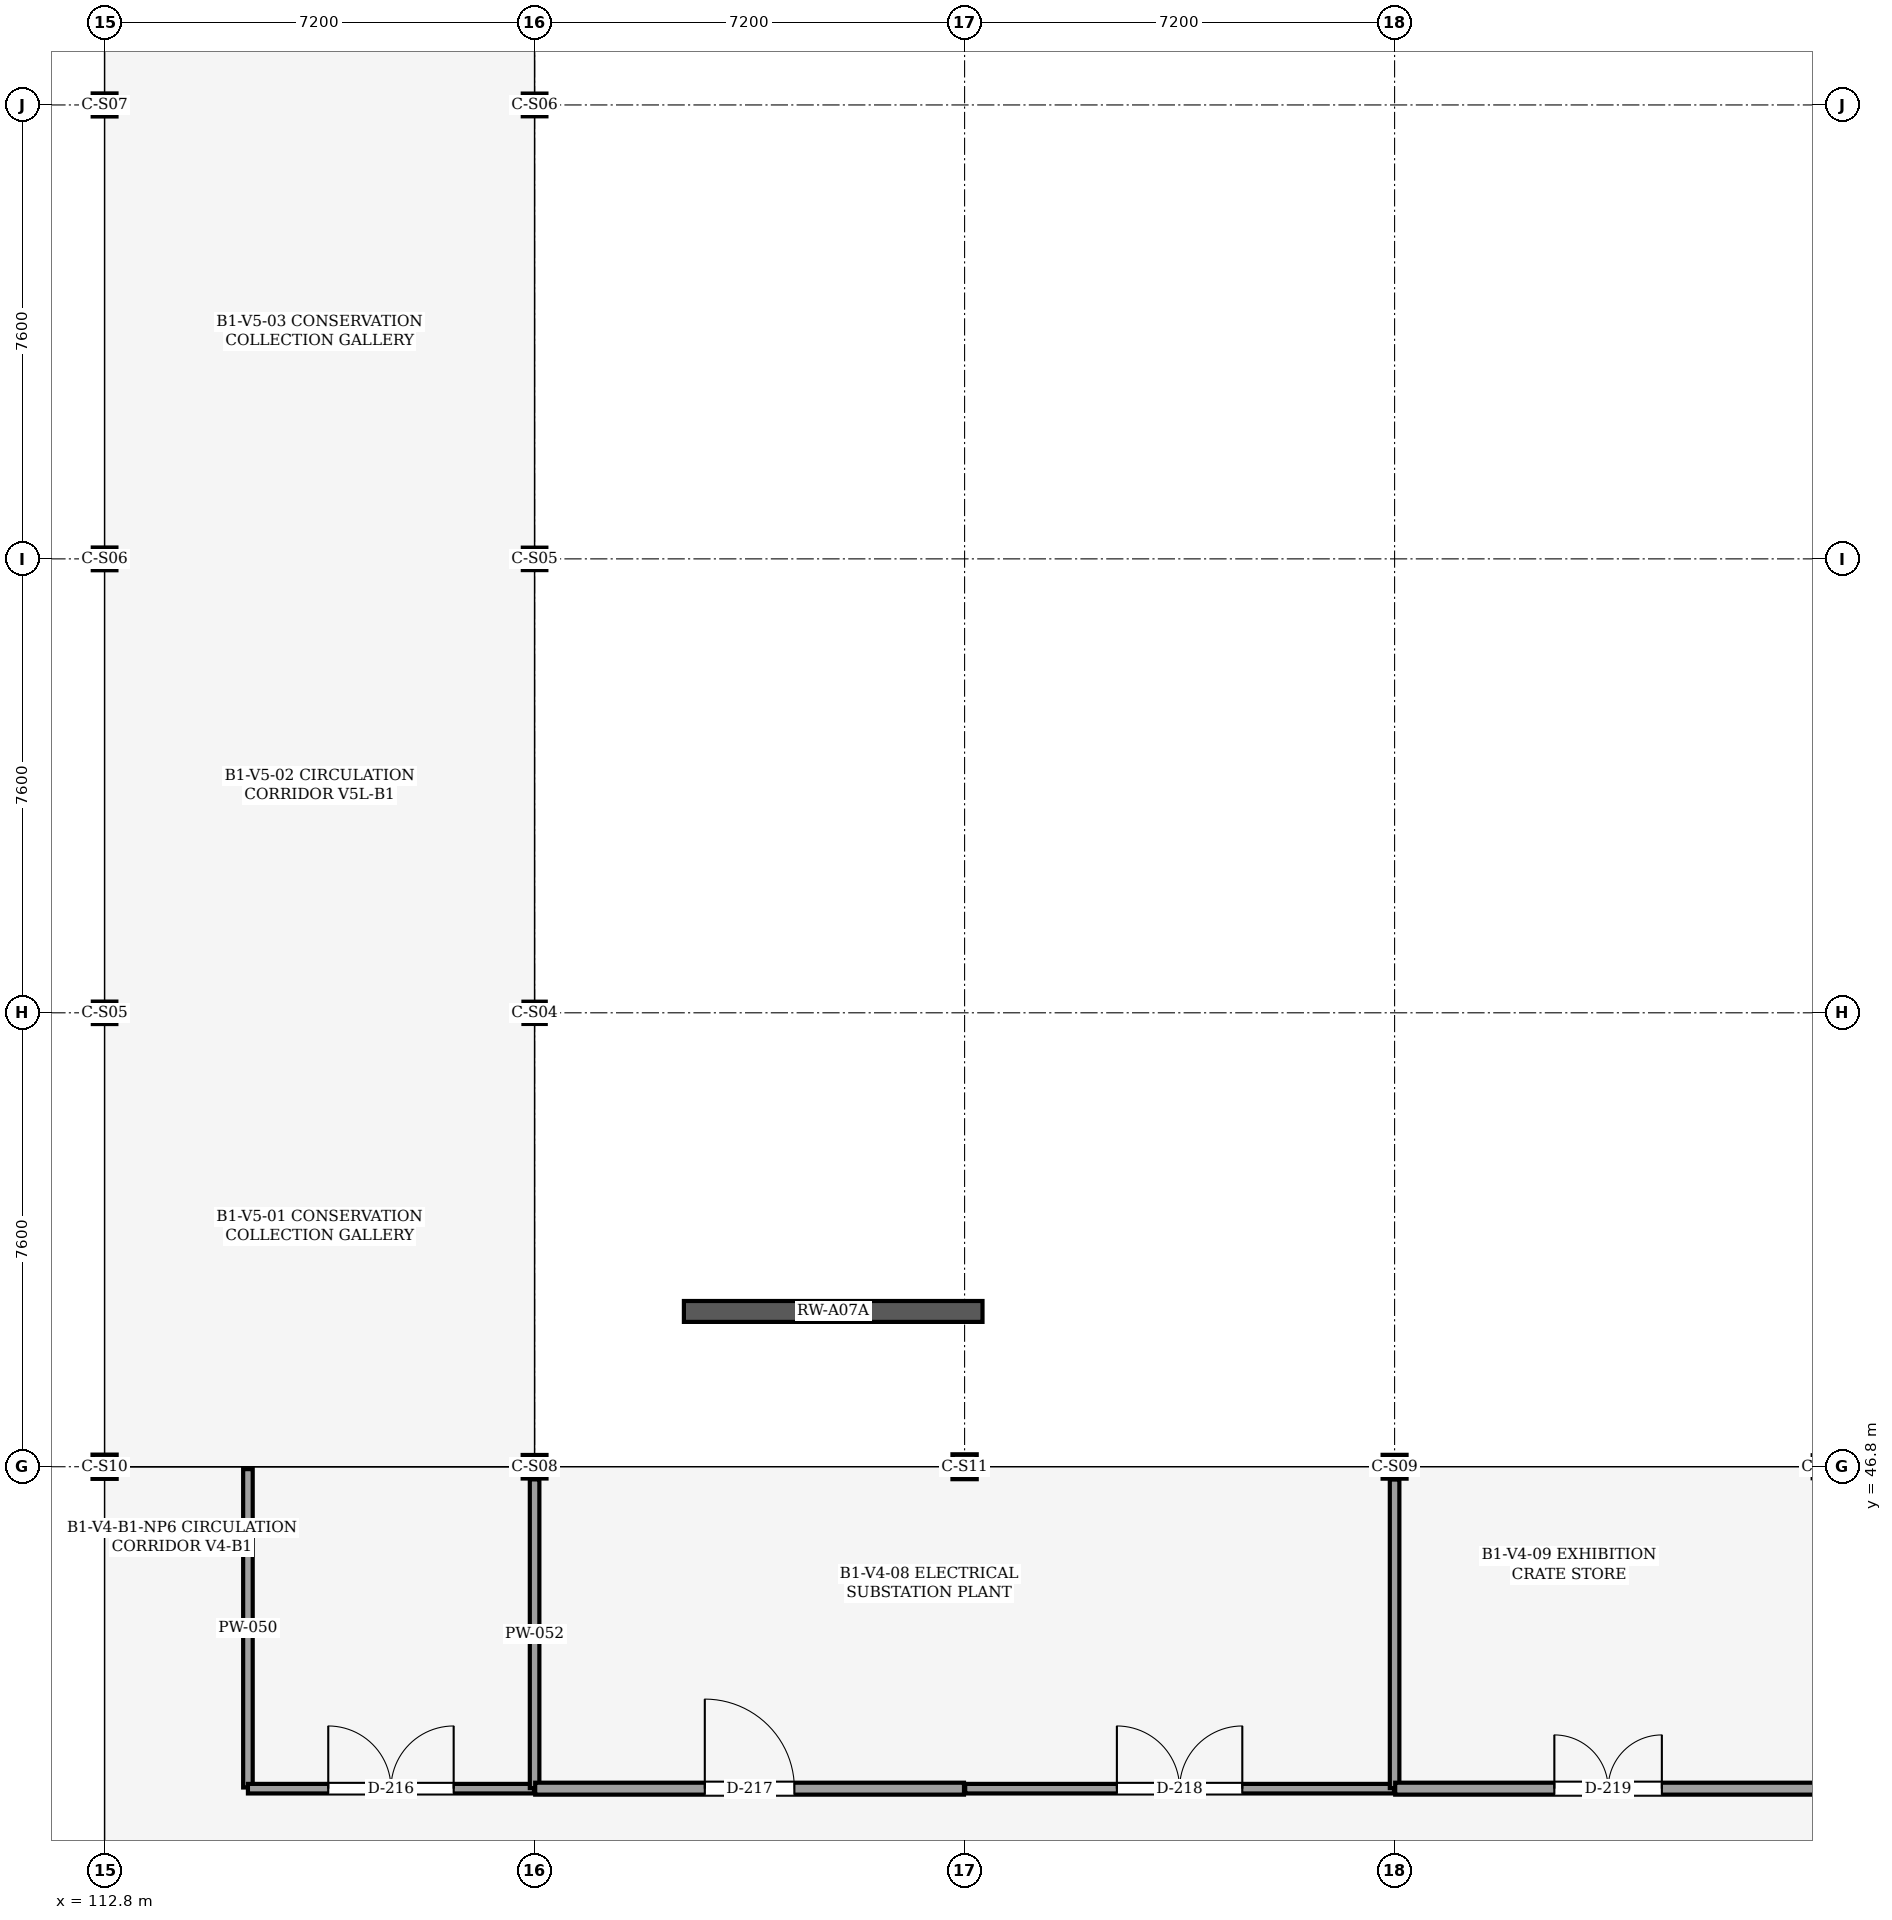
"""IFC4 building model, lengths in metres.
Left out: names, types, materials, properties, quantities, classifications, styles, units other than length and angle.
Written with IfcOpenShell. Run it as: python <this file> out.ifc"""

import sys

from ifc_helpers import new_model, si_unit, direction, frame, frame_2d, origin, origin_2d, place, context, subcontext, project, spatial, rectangle, i_section, extrude, element, fill, save


model = new_model("IFC4")
c1 = context("Model", 3, precision=1e-05, world=origin(), true_north=direction((0.0, 1.0)))
c2 = subcontext(c1, "Body", "Model", "MODEL_VIEW")
j1 = project(units=[si_unit("LENGTHUNIT", "METRE"), si_unit("PLANEANGLEUNIT", "RADIAN")], contexts=[c1])
p1 = place(None, origin())
s1 = spatial("IfcSite", under=j1, at=p1, CompositionType="ELEMENT")
p2 = place(p1, origin())
s2 = spatial("IfcBuilding", under=s1, at=p2, CompositionType="ELEMENT")
p3 = place(p2, frame((0.0, 0.0, -5.4)))
s3 = spatial("IfcBuildingStorey", under=s2, at=p3, CompositionType="ELEMENT", Elevation=-5.4)
p4 = place(p3, frame((112.8, 46.8, 0.0), z_axis=(0.0, 0.0, 1.0), x_axis=(1.0, 0.0, 0.0)))
e1 = element("IfcColumn", 1, at=p4, inside=s3, PredefinedType="COLUMN", context=c2, shape_type="SweptSolid", body=[
    extrude(i_section(OverallWidth=0.404, OverallDepth=0.406, WebThickness=0.027, FlangeThickness=0.044, FilletRadius=0.025, at=origin_2d()), origin(), (0.0, 0.0, 1.0), 5.4),
])
p5 = place(p3, frame((112.8, 54.4, 0.0), z_axis=(0.0, 0.0, 1.0), x_axis=(1.0, 0.0, 0.0)))
e2 = element("IfcColumn", 2, at=p5, inside=s3, PredefinedType="COLUMN", context=c2, shape_type="SweptSolid", body=[
    extrude(i_section(OverallWidth=0.394, OverallDepth=0.376, WebThickness=0.017, FlangeThickness=0.028, FilletRadius=0.025, at=origin_2d()), origin(), (0.0, 0.0, 1.0), 5.4),
])
p6 = place(p3, frame((112.8, 62.0, 0.0), z_axis=(0.0, 0.0, 1.0), x_axis=(1.0, 0.0, 0.0)))
e3 = element("IfcColumn", 3, at=p6, inside=s3, PredefinedType="COLUMN", context=c2, shape_type="SweptSolid", body=[
    extrude(i_section(OverallWidth=0.396, OverallDepth=0.381, WebThickness=0.019, FlangeThickness=0.03, FilletRadius=0.025, at=origin_2d()), origin(), (0.0, 0.0, 1.0), 5.4),
])
p7 = place(p3, frame((112.8, 69.6, 0.0), z_axis=(0.0, 0.0, 1.0), x_axis=(1.0, 0.0, 0.0)))
e4 = element("IfcColumn", 4, at=p7, inside=s3, PredefinedType="COLUMN", context=c2, shape_type="SweptSolid", body=[
    extrude(i_section(OverallWidth=0.399, OverallDepth=0.386, WebThickness=0.021, FlangeThickness=0.033, FilletRadius=0.025, at=origin_2d()), origin(), (0.0, 0.0, 1.0), 5.4),
])
p8 = place(p3, frame((120.0, 46.8, 0.0), z_axis=(0.0, 0.0, 1.0), x_axis=(1.0, 0.0, 0.0)))
e5 = element("IfcColumn", 5, at=p8, inside=s3, PredefinedType="COLUMN", context=c2, shape_type="SweptSolid", body=[
    extrude(i_section(OverallWidth=0.399, OverallDepth=0.394, WebThickness=0.023, FlangeThickness=0.037, FilletRadius=0.025, at=origin_2d()), origin(), (0.0, 0.0, 1.0), 5.4),
])
p9 = place(p3, frame((120.0, 54.4, 0.0), z_axis=(0.0, 0.0, 1.0), x_axis=(1.0, 0.0, 0.0)))
e6 = element("IfcColumn", 6, at=p9, inside=s3, PredefinedType="COLUMN", context=c2, shape_type="SweptSolid", body=[
    extrude(i_section(OverallWidth=0.373, OverallDepth=0.373, WebThickness=0.016, FlangeThickness=0.026, FilletRadius=0.025, at=origin_2d()), origin(), (0.0, 0.0, 1.0), 5.4),
])
p10 = place(p3, frame((120.0, 62.0, 0.0), z_axis=(0.0, 0.0, 1.0), x_axis=(1.0, 0.0, 0.0)))
e7 = element("IfcColumn", 7, at=p10, inside=s3, PredefinedType="COLUMN", context=c2, shape_type="SweptSolid", body=[
    extrude(i_section(OverallWidth=0.394, OverallDepth=0.376, WebThickness=0.017, FlangeThickness=0.028, FilletRadius=0.025, at=origin_2d()), origin(), (0.0, 0.0, 1.0), 5.4),
])
p11 = place(p3, frame((120.0, 69.6, 0.0), z_axis=(0.0, 0.0, 1.0), x_axis=(1.0, 0.0, 0.0)))
e8 = element("IfcColumn", 8, at=p11, inside=s3, PredefinedType="COLUMN", context=c2, shape_type="SweptSolid", body=[
    extrude(i_section(OverallWidth=0.396, OverallDepth=0.381, WebThickness=0.019, FlangeThickness=0.03, FilletRadius=0.025, at=origin_2d()), origin(), (0.0, 0.0, 1.0), 5.4),
])
p12 = place(p3, frame((127.2, 46.8, 0.0), z_axis=(0.0, 0.0, 1.0), x_axis=(1.0, 0.0, 0.0)))
e9 = element("IfcColumn", 9, at=p12, inside=s3, PredefinedType="COLUMN", context=c2, shape_type="SweptSolid", body=[
    extrude(i_section(OverallWidth=0.406, OverallDepth=0.417, WebThickness=0.03, FlangeThickness=0.048, FilletRadius=0.025, at=origin_2d()), origin(), (0.0, 0.0, 1.0), 5.4),
])
p13 = place(p3, frame((134.4, 46.8, 0.0), z_axis=(0.0, 0.0, 1.0), x_axis=(1.0, 0.0, 0.0)))
e10 = element("IfcColumn", 10, at=p13, inside=s3, PredefinedType="COLUMN", context=c2, shape_type="SweptSolid", body=[
    extrude(i_section(OverallWidth=0.401, OverallDepth=0.399, WebThickness=0.025, FlangeThickness=0.04, FilletRadius=0.025, at=origin_2d()), origin(), (0.0, 0.0, 1.0), 5.4),
])
p14 = place(p3, frame((122.5, 49.4, -0.45), z_axis=(0.0, 0.0, 1.0), x_axis=(1.0, 0.0, 0.0)))
e11 = element("IfcWall", 11, at=p14, inside=s3, PredefinedType="USERDEFINED", context=c2, shape_type="SweptSolid", body=[
    extrude(rectangle(XDim=5.0, YDim=0.35, at=frame_2d((2.5, 0.0))), origin(), (0.0, 0.0, 1.0), 5.6),
])
p15 = place(p3, frame((115.2, 41.43, 0.0), z_axis=(0.0, 0.0, 1.0), x_axis=(0.0, 1.0, 0.0)))
e12 = element("IfcWall", 12, at=p15, inside=s3, PredefinedType="PARTITIONING", context=c2, shape_type="SweptSolid", body=[
    extrude(rectangle(XDim=5.33, YDim=0.16, at=frame_2d((2.665, 0.0))), origin(), (0.0, 0.0, 1.0), 5.1),
])
p16 = place(p3, frame((115.2, 41.41, 0.0), z_axis=(0.0, 0.0, 1.0), x_axis=(1.0, 0.0, 0.0)))
e13 = element("IfcWall", 13, at=p16, inside=s3, PredefinedType="PARTITIONING", context=c2, shape_type="SweptSolid", body=[
    extrude(rectangle(XDim=4.79, YDim=0.16, at=frame_2d((2.395, 0.0))), origin(), (0.0, 0.0, 1.0), 5.1),
])
p17 = place(p16, frame((1.345, 0.0, 0.0)))
e14 = element("IfcOpeningElement", 14, at=p17, cuts=e13, PredefinedType="OPENING", context=c2, shape_type="SweptSolid", body=[
    extrude(rectangle(XDim=2.1, YDim=2.5, at=frame_2d((1.05, 1.25))), frame((0.0, 0.09, 0.0), z_axis=(0.0, -1.0, 0.0), x_axis=(1.0, 0.0, 0.0)), (0.0, 0.0, 1.0), 0.18),
])
p18 = place(p3, frame((120.0, 41.42, 0.0), z_axis=(0.0, 0.0, 1.0), x_axis=(0.0, 1.0, 0.0)))
e15 = element("IfcWall", 15, at=p18, inside=s3, PredefinedType="PARTITIONING", context=c2, shape_type="SweptSolid", body=[
    extrude(rectangle(XDim=5.168, YDim=0.16, at=frame_2d((2.584, 0.0))), origin(), (0.0, 0.0, 1.0), 4.224),
])
p19 = place(p3, frame((120.01, 41.41, 0.0), z_axis=(0.0, 0.0, 1.0), x_axis=(1.0, 0.0, 0.0)))
e16 = element("IfcWall", 16, at=p19, inside=s3, PredefinedType="PARTITIONING", context=c2, shape_type="SweptSolid", body=[
    extrude(rectangle(XDim=7.18, YDim=0.2, at=frame_2d((3.59, 0.0))), origin(), (0.0, 0.0, 1.0), 5.1),
])
p20 = place(p19, frame((2.84, 0.0, 0.0)))
e17 = element("IfcOpeningElement", 17, at=p20, cuts=e16, PredefinedType="OPENING", context=c2, shape_type="SweptSolid", body=[
    extrude(rectangle(XDim=1.5, YDim=2.2, at=frame_2d((0.75, 1.1))), frame((0.0, 0.11, 0.0), z_axis=(0.0, -1.0, 0.0), x_axis=(1.0, 0.0, 0.0)), (0.0, 0.0, 1.0), 0.22),
])
p21 = place(p3, frame((127.21, 41.41, 0.0), z_axis=(0.0, 0.0, 1.0), x_axis=(1.0, 0.0, 0.0)))
e18 = element("IfcWall", 18, at=p21, inside=s3, PredefinedType="PARTITIONING", context=c2, shape_type="SweptSolid", body=[
    extrude(rectangle(XDim=7.18, YDim=0.16, at=frame_2d((3.59, 0.0))), origin(), (0.0, 0.0, 1.0), 5.1),
])
p22 = place(p21, frame((2.54, 0.0, 0.0)))
e19 = element("IfcOpeningElement", 19, at=p22, cuts=e18, PredefinedType="OPENING", context=c2, shape_type="SweptSolid", body=[
    extrude(rectangle(XDim=2.1, YDim=2.5, at=frame_2d((1.05, 1.25))), frame((0.0, 0.09, 0.0), z_axis=(0.0, -1.0, 0.0), x_axis=(1.0, 0.0, 0.0)), (0.0, 0.0, 1.0), 0.18),
])
p23 = place(p3, frame((134.4, 41.42, 0.0), z_axis=(0.0, 0.0, 1.0), x_axis=(0.0, 1.0, 0.0)))
e20 = element("IfcWall", 20, at=p23, inside=s3, PredefinedType="PARTITIONING", context=c2, shape_type="SweptSolid", body=[
    extrude(rectangle(XDim=5.166, YDim=0.16, at=frame_2d((2.583, 0.0))), origin(), (0.0, 0.0, 1.0), 4.407),
])
p24 = place(p3, frame((134.41, 41.41, 0.0), z_axis=(0.0, 0.0, 1.0), x_axis=(1.0, 0.0, 0.0)))
e21 = element("IfcWall", 21, at=p24, inside=s3, PredefinedType="PARTITIONING", context=c2, shape_type="SweptSolid", body=[
    extrude(rectangle(XDim=7.13, YDim=0.2, at=frame_2d((3.565, 0.0))), origin(), (0.0, 0.0, 1.0), 5.1),
])
p25 = place(p24, frame((2.665, 0.0, 0.0)))
e22 = element("IfcOpeningElement", 22, at=p25, cuts=e21, PredefinedType="OPENING", context=c2, shape_type="SweptSolid", body=[
    extrude(rectangle(XDim=1.8, YDim=2.4, at=frame_2d((0.9, 1.2))), frame((0.0, 0.11, 0.0), z_axis=(0.0, -1.0, 0.0), x_axis=(1.0, 0.0, 0.0)), (0.0, 0.0, 1.0), 0.22),
])
p26 = place(p17, origin())
e23 = element("IfcDoor", 23, at=p26, inside=s3, OperationType="DOUBLE_DOOR_SINGLE_SWING", PredefinedType="DOOR", context=c2, shape_type="SweptSolid", body=[
    extrude(rectangle(XDim=2.1, YDim=2.5, at=frame_2d((1.05, 1.25))), frame((0.0, 0.025, 0.0), z_axis=(0.0, -1.0, 0.0), x_axis=(1.0, 0.0, 0.0)), (0.0, 0.0, 1.0), 0.05),
])
fill(e14, e23)
p27 = place(p20, origin())
e24 = element("IfcDoor", 24, at=p27, inside=s3, OperationType="SINGLE_SWING_LEFT", PredefinedType="DOOR", context=c2, shape_type="SweptSolid", body=[
    extrude(rectangle(XDim=1.5, YDim=2.2, at=frame_2d((0.75, 1.1))), frame((0.0, 0.025, 0.0), z_axis=(0.0, -1.0, 0.0), x_axis=(1.0, 0.0, 0.0)), (0.0, 0.0, 1.0), 0.05),
])
fill(e17, e24)
p28 = place(p22, origin())
e25 = element("IfcDoor", 25, at=p28, inside=s3, OperationType="DOUBLE_DOOR_SINGLE_SWING", PredefinedType="DOOR", context=c2, shape_type="SweptSolid", body=[
    extrude(rectangle(XDim=2.1, YDim=2.5, at=frame_2d((1.05, 1.25))), frame((0.0, 0.025, 0.0), z_axis=(0.0, -1.0, 0.0), x_axis=(1.0, 0.0, 0.0)), (0.0, 0.0, 1.0), 0.05),
])
fill(e19, e25)
p29 = place(p25, origin())
e26 = element("IfcDoor", 26, at=p29, inside=s3, OperationType="DOUBLE_DOOR_SINGLE_SWING", PredefinedType="DOOR", context=c2, shape_type="SweptSolid", body=[
    extrude(rectangle(XDim=1.8, YDim=2.4, at=frame_2d((0.9, 1.2))), frame((0.0, 0.025, 0.0), z_axis=(0.0, -1.0, 0.0), x_axis=(1.0, 0.0, 0.0)), (0.0, 0.0, 1.0), 0.05),
])
fill(e22, e26)
save(model, sys.argv[1])
